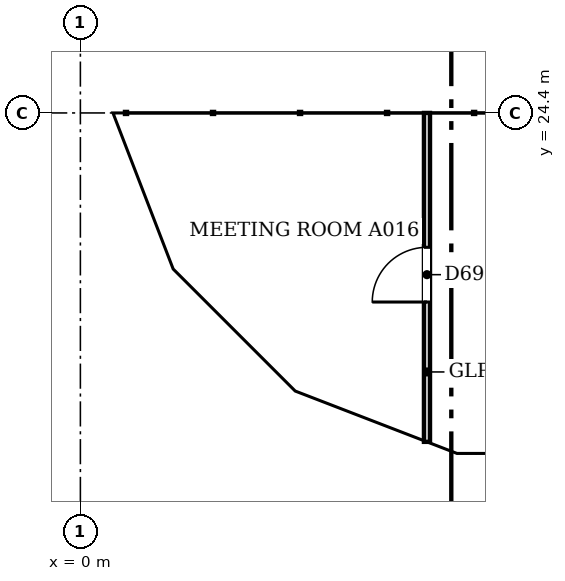
"""IFC4 building model, lengths in metres.
Left out: names, types, materials, properties, quantities, classifications, styles, units other than length and angle.
Written with IfcOpenShell. Run it as: python <this file> out.ifc"""

import sys

from ifc_helpers import new_model, si_unit, direction, frame, frame_2d, origin, place, context, subcontext, project, spatial, polyline, rectangle, outline, extrude, faceted_brep, source, transform, mapped, element, fill, save


model = new_model("IFC4")
c1 = context("Model", 3, precision=1e-05, world=origin(), true_north=direction((0.0, 1.0)))
c2 = subcontext(c1, "Body", "Model", "MODEL_VIEW")
j1 = project(units=[si_unit("LENGTHUNIT", "METRE"), si_unit("PLANEANGLEUNIT", "RADIAN")], contexts=[c1])
p1 = place(None, origin())
s1 = spatial("IfcSite", under=j1, at=p1, CompositionType="ELEMENT")
p2 = place(p1, origin())
s2 = spatial("IfcBuilding", under=s1, at=p2, CompositionType="ELEMENT")
p3 = place(p2, frame((0.0, 0.0, 25.8)))
s3 = spatial("IfcBuildingStorey", under=s2, at=p3, CompositionType="ELEMENT", Elevation=25.8)
m1 = source(origin(), c2, "Body", "Brep", [
    faceted_brep([(6.053, -0.25, 0.0), (3.05, -0.25, 3.8), (0.0, -0.25, 0.0), (0.0, 0.25, 0.0), (3.05, 0.25, 3.8), (6.007, 0.25, 0.059), (6.007, 0.25, 0.0), (6.053, 0.0, 0.0)], [[[0, 1, 2]], [[3, 4, 5, 6]], [[5, 4, 1, 0, 7]], [[4, 3, 2, 1]], [[3, 6, 7, 0, 2]], [[7, 6, 5]]]),
])
p4 = place(p3, frame((0.25, 30.5, 0.0), z_axis=(0.0, 0.0, 1.0), x_axis=(0.0, -1.0, 0.0)))
e1 = element("IfcWall", 1, at=p4, inside=s3, PredefinedType="SOLIDWALL", context=c2, shape_type="MappedRepresentation", body=[
    mapped(m1, transform((0.0, 0.0, 0.0), scale=1.0)),
])
m2 = source(origin(), c2, "Body", "SweptSolid", [
    extrude(outline(polyline([(5.537, 0.25), (3.049, 3.399), (0.521, 0.25), (5.537, 0.25)])), frame((0.0, 0.26, 0.0), z_axis=(0.0, -1.0, 0.0), x_axis=(1.0, 0.0, 0.0)), (0.0, 0.0, 1.0), 0.52),
])
p5 = place(p4, origin())
e2 = element("IfcOpeningElement", 2, at=p5, cuts=e1, PredefinedType="OPENING", context=c2, shape_type="MappedRepresentation", body=[
    mapped(m2, transform((0.0, 0.0, 0.0), scale=1.0)),
])
m3 = source(origin(), c2, "Body", "Brep", [
    faceted_brep([(3.003, -0.25, 3.732), (2.95, -0.25, 3.8), (0.0, -0.25, 0.0), (3.003, -0.25, 0.0), (0.047, 0.25, 0.06), (2.898, 0.25, 3.732), (2.898, 0.25, 0.0), (0.047, 0.25, 0.0), (2.95, 0.0, 3.8), (0.0, 0.0, 0.0)], [[[0, 1, 2, 3]], [[4, 5, 6, 7]], [[8, 1, 0]], [[5, 4, 9, 2, 1, 8]], [[7, 6, 3, 2, 9]], [[7, 9, 4]], [[3, 6, 5, 8, 0]]]),
])
p6 = place(p3, frame((0.25, 24.447, 0.0), z_axis=(0.0, 0.0, 1.0), x_axis=(0.35992665181, -0.932980602862, 0.0)))
e3 = element("IfcWall", 3, at=p6, inside=s3, PredefinedType="SOLIDWALL", context=c2, shape_type="MappedRepresentation", body=[
    mapped(m3, transform((0.0, 0.0, 0.0), scale=1.0)),
])
m4 = source(origin(), c2, "Body", "SweptSolid", [
    extrude(outline(polyline([(2.75, 3.135), (0.511, 0.25), (2.75, 0.25), (2.75, 3.135)])), frame((0.0, 0.26, 0.0), z_axis=(0.0, -1.0, 0.0), x_axis=(1.0, 0.0, 0.0)), (0.0, 0.0, 1.0), 0.52),
])
p7 = place(p6, origin())
e4 = element("IfcOpeningElement", 4, at=p7, cuts=e3, PredefinedType="OPENING", context=c2, shape_type="MappedRepresentation", body=[
    mapped(m4, transform((0.0, 0.0, 0.0), scale=1.0)),
])
m5 = source(origin(), c2, "Body", "Brep", [
    faceted_brep([(2.997, -0.25, 0.0), (0.053, -0.25, 3.8), (0.0, -0.25, 3.732), (0.0, -0.25, 0.0), (0.106, 0.25, 3.732), (2.944, 0.25, 0.068), (2.944, 0.25, 0.0), (0.106, 0.25, 0.0), (0.053, 0.0, 3.8), (2.997, 0.0, 0.0)], [[[0, 1, 2, 3]], [[4, 5, 6, 7]], [[5, 4, 8, 1, 0, 9]], [[2, 1, 8]], [[7, 6, 9, 0, 3]], [[7, 3, 2, 8, 4]], [[9, 6, 5]]]),
])
p8 = place(p3, frame((1.274, 21.731, 0.0), z_axis=(0.0, 0.0, 1.0), x_axis=(0.707147509625, -0.707066050402, 0.0)))
e5 = element("IfcWall", 5, at=p8, inside=s3, PredefinedType="SOLIDWALL", context=c2, shape_type="MappedRepresentation", body=[
    mapped(m5, transform((0.0, 0.0, 0.0), scale=1.0)),
])
m6 = source(origin(), c2, "Body", "SweptSolid", [
    extrude(outline(polyline([(2.487, 0.25), (0.253, 3.134), (0.253, 0.25), (2.487, 0.25)])), frame((0.0, 0.26, 0.0), z_axis=(0.0, -1.0, 0.0), x_axis=(1.0, 0.0, 0.0)), (0.0, 0.0, 1.0), 0.52),
])
p9 = place(p8, origin())
e6 = element("IfcOpeningElement", 6, at=p9, cuts=e5, PredefinedType="OPENING", context=c2, shape_type="MappedRepresentation", body=[
    mapped(m6, transform((0.0, 0.0, 0.0), scale=1.0)),
])
m7 = source(origin(), c2, "Body", "Brep", [
    faceted_brep([(2.997, -0.25, 3.741), (2.95, -0.25, 3.8), (0.0, -0.25, 0.0), (2.997, -0.25, 0.0), (0.053, 0.25, 0.068), (2.904, 0.25, 3.74), (2.904, 0.25, 0.0), (0.053, 0.25, 0.0), (2.95, 0.0, 3.8), (0.0, 0.0, 0.0)], [[[0, 1, 2, 3]], [[4, 5, 6, 7]], [[8, 1, 0]], [[5, 4, 9, 2, 1, 8]], [[7, 6, 3, 2, 9]], [[7, 9, 4]], [[3, 6, 5, 8, 0]]]),
])
p10 = place(p3, frame((3.394, 19.612, 0.0), z_axis=(0.0, 0.0, 1.0), x_axis=(0.932990326376, -0.359901446078, 0.0)))
e7 = element("IfcWall", 7, at=p10, inside=s3, PredefinedType="SOLIDWALL", context=c2, shape_type="MappedRepresentation", body=[
    mapped(m7, transform((0.0, 0.0, 0.0), scale=1.0)),
])
p11 = place(p10, origin())
e8 = element("IfcOpeningElement", 8, at=p11, cuts=e7, PredefinedType="OPENING", context=c2, shape_type="MappedRepresentation", body=[
    mapped(m4, transform((0.0, 0.0, 0.0), scale=1.0)),
])
m8 = source(origin(), c2, "Body", "Brep", [
    faceted_brep([(3.05, -0.25, 0.0), (0.047, -0.25, 3.8), (0.0, -0.25, 3.74), (0.0, -0.25, 0.0), (0.093, 0.25, 3.741), (3.05, 0.25, 0.0), (0.093, 0.25, 0.0), (0.047, 0.0, 3.8)], [[[0, 1, 2, 3]], [[4, 5, 6]], [[5, 4, 7, 1, 0]], [[2, 1, 7]], [[6, 5, 0, 3]], [[6, 3, 2, 7, 4]]]),
])
p12 = place(p3, frame((6.1, 18.55, 0.0), z_axis=(0.0, 0.0, 1.0), x_axis=(1.0, 0.0, 0.0)))
e9 = element("IfcWall", 9, at=p12, inside=s3, PredefinedType="SOLIDWALL", context=c2, shape_type="MappedRepresentation", body=[
    mapped(m8, transform((0.0, 0.0, 0.0), scale=1.0)),
])
m9 = source(origin(), c2, "Body", "SweptSolid", [
    extrude(outline(polyline([(2.534, 0.25), (0.247, 3.144), (0.247, 0.25), (2.534, 0.25)])), frame((0.0, 0.26, 0.0), z_axis=(0.0, -1.0, 0.0), x_axis=(1.0, 0.0, 0.0)), (0.0, 0.0, 1.0), 0.52),
])
p13 = place(p12, origin())
e10 = element("IfcOpeningElement", 10, at=p13, cuts=e9, PredefinedType="OPENING", context=c2, shape_type="MappedRepresentation", body=[
    mapped(m9, transform((0.0, 0.0, 0.0), scale=1.0)),
])
p14 = place(p2, frame((0.0, 0.0, 29.6)))
s4 = spatial("IfcBuildingStorey", under=s2, at=p14, CompositionType="ELEMENT", Elevation=29.6)
m10 = source(origin(), c2, "Body", "Brep", [
    faceted_brep([(3.003, -0.25, 0.0), (3.05, -0.25, 0.06), (3.05, -0.25, 7.54), (3.003, -0.25, 7.6), (0.0, -0.25, 3.8), (0.0, 0.25, 3.8), (2.957, 0.25, 7.541), (2.957, 0.25, 0.059), (3.003, 0.0, 0.0), (3.003, 0.0, 7.6)], [[[0, 1, 2, 3, 4]], [[5, 6, 7]], [[1, 0, 8]], [[9, 3, 2]], [[6, 5, 4, 3, 9]], [[5, 7, 8, 0, 4]], [[1, 8, 7, 6, 9, 2]]]),
])
p15 = place(p14, frame((0.25, 27.45, -3.8), z_axis=(0.0, 0.0, 1.0), x_axis=(0.0, -1.0, 0.0)))
e11 = element("IfcWall", 11, at=p15, inside=s4, PredefinedType="SOLIDWALL", context=c2, shape_type="MappedRepresentation", body=[
    mapped(m10, transform((0.0, 0.0, 0.0), scale=1.0)),
])
m11 = source(origin(), c2, "Body", "SweptSolid", [
    extrude(outline(polyline([(2.803, 6.944), (0.319, 3.8), (2.803, 0.656), (2.803, 6.944)])), frame((0.0, 0.26, 0.0), z_axis=(0.0, -1.0, 0.0), x_axis=(1.0, 0.0, 0.0)), (0.0, 0.0, 1.0), 0.52),
])
p16 = place(p15, origin())
e12 = element("IfcOpeningElement", 12, at=p16, cuts=e11, PredefinedType="OPENING", context=c2, shape_type="MappedRepresentation", body=[
    mapped(m11, transform((0.0, 0.0, 0.0), scale=1.0)),
])
m12 = source(origin(), c2, "Body", "Brep", [
    faceted_brep([(0.047, -0.25, 0.0), (2.997, -0.25, 3.8), (0.047, -0.25, 7.6), (0.0, -0.25, 7.541), (0.0, -0.25, 0.059), (0.093, 0.25, 7.54), (2.944, 0.25, 3.868), (2.944, 0.25, 3.732), (0.093, 0.25, 0.06), (2.997, 0.0, 3.8), (0.047, 0.0, 0.0), (0.047, 0.0, 7.6)], [[[0, 1, 2, 3, 4]], [[5, 6, 7, 8]], [[8, 7, 9, 1, 0, 10]], [[6, 5, 11, 2, 1, 9]], [[3, 2, 11]], [[10, 0, 4]], [[8, 10, 4, 3, 11, 5]], [[7, 6, 9]]]),
])
p17 = place(p14, frame((0.233, 24.49, -3.8), z_axis=(0.0, 0.0, 1.0), x_axis=(0.359901446078, -0.932990326376, 0.0)))
e13 = element("IfcWall", 13, at=p17, inside=s4, PredefinedType="SOLIDWALL", context=c2, shape_type="MappedRepresentation", body=[
    mapped(m12, transform((0.0, 0.0, 0.0), scale=1.0)),
])
m13 = source(origin(), c2, "Body", "SweptSolid", [
    extrude(outline(polyline([(0.247, 0.665), (2.681, 3.8), (0.247, 6.935), (0.247, 0.665)])), frame((0.0, 0.26, 0.0), z_axis=(0.0, -1.0, 0.0), x_axis=(1.0, 0.0, 0.0)), (0.0, 0.0, 1.0), 0.52),
])
p18 = place(p17, origin())
e14 = element("IfcOpeningElement", 14, at=p18, cuts=e13, PredefinedType="OPENING", context=c2, shape_type="MappedRepresentation", body=[
    mapped(m13, transform((0.0, 0.0, 0.0), scale=1.0)),
])
m14 = source(origin(), c2, "Body", "Brep", [
    faceted_brep([(2.944, -0.25, 0.0), (2.997, -0.25, 0.068), (2.997, -0.25, 7.532), (2.944, -0.25, 7.6), (0.0, -0.25, 3.8), (0.053, 0.25, 3.868), (2.891, 0.25, 7.532), (2.891, 0.25, 0.068), (0.053, 0.25, 3.732), (2.944, 0.0, 0.0), (2.944, 0.0, 7.6), (0.0, 0.0, 3.8)], [[[0, 1, 2, 3, 4]], [[5, 6, 7, 8]], [[1, 0, 9]], [[10, 3, 2]], [[6, 5, 11, 4, 3, 10]], [[8, 7, 9, 0, 4, 11]], [[8, 11, 5]], [[1, 9, 7, 6, 10, 2]]]),
])
p19 = place(p14, frame((1.312, 21.694, -3.8), z_axis=(0.0, 0.0, 1.0), x_axis=(0.707066050402, -0.707147509625, 0.0)))
e15 = element("IfcWall", 15, at=p19, inside=s4, PredefinedType="SOLIDWALL", context=c2, shape_type="MappedRepresentation", body=[
    mapped(m14, transform((0.0, 0.0, 0.0), scale=1.0)),
])
m15 = source(origin(), c2, "Body", "SweptSolid", [
    extrude(outline(polyline([(2.744, 6.934), (0.316, 3.8), (2.744, 0.666), (2.744, 6.934)])), frame((0.0, 0.26, 0.0), z_axis=(0.0, -1.0, 0.0), x_axis=(1.0, 0.0, 0.0)), (0.0, 0.0, 1.0), 0.52),
])
p20 = place(p19, origin())
e16 = element("IfcOpeningElement", 16, at=p20, cuts=e15, PredefinedType="OPENING", context=c2, shape_type="MappedRepresentation", body=[
    mapped(m15, transform((0.0, 0.0, 0.0), scale=1.0)),
])
m16 = source(origin(), c2, "Body", "Brep", [
    faceted_brep([(0.053, -0.25, 0.0), (3.003, -0.25, 3.8), (0.053, -0.25, 7.6), (0.0, -0.25, 7.531), (0.0, -0.25, 0.068), (0.106, 0.25, 7.532), (2.957, 0.25, 3.86), (2.957, 0.25, 3.74), (0.106, 0.25, 0.068), (3.003, 0.0, 3.8), (0.053, 0.0, 0.0), (0.053, 0.0, 7.6)], [[[0, 1, 2, 3, 4]], [[5, 6, 7, 8]], [[8, 7, 9, 1, 0, 10]], [[6, 5, 11, 2, 1, 9]], [[3, 2, 11]], [[10, 0, 4]], [[8, 10, 4, 3, 11, 5]], [[7, 6, 9]]]),
])
p21 = place(p14, frame((3.344, 19.631, -3.8), z_axis=(0.0, 0.0, 1.0), x_axis=(0.933007896601, -0.359855894603, 0.0)))
e17 = element("IfcWall", 17, at=p21, inside=s4, PredefinedType="SOLIDWALL", context=c2, shape_type="MappedRepresentation", body=[
    mapped(m16, transform((0.0, 0.0, 0.0), scale=1.0)),
])
m17 = source(origin(), c2, "Body", "SweptSolid", [
    extrude(outline(polyline([(0.253, 0.665), (2.687, 3.8), (0.253, 6.935), (0.253, 0.665)])), frame((0.0, 0.26, 0.0), z_axis=(0.0, -1.0, 0.0), x_axis=(1.0, 0.0, 0.0)), (0.0, 0.0, 1.0), 0.52),
])
p22 = place(p21, origin())
e18 = element("IfcOpeningElement", 18, at=p22, cuts=e17, PredefinedType="OPENING", context=c2, shape_type="MappedRepresentation", body=[
    mapped(m17, transform((0.0, 0.0, 0.0), scale=1.0)),
])
m18 = source(origin(), c2, "Body", "Brep", [
    faceted_brep([(3.003, -0.25, 0.0), (6.053, -0.25, 3.8), (3.003, -0.25, 7.6), (0.0, -0.25, 3.8), (0.047, 0.25, 3.859), (3.003, 0.25, 7.6), (6.053, 0.25, 3.8), (3.003, 0.25, 0.0), (0.047, 0.25, 3.741), (0.0, 0.0, 3.8)], [[[0, 1, 2, 3]], [[4, 5, 6, 7, 8]], [[7, 6, 1, 0]], [[6, 5, 2, 1]], [[5, 4, 9, 3, 2]], [[8, 7, 0, 3, 9]], [[8, 9, 4]]]),
])
p23 = place(p14, frame((6.146, 18.55, -3.8), z_axis=(0.0, 0.0, 1.0), x_axis=(1.0, 0.0, 0.0)))
e19 = element("IfcWall", 19, at=p23, inside=s4, PredefinedType="SOLIDWALL", context=c2, shape_type="MappedRepresentation", body=[
    mapped(m18, transform((0.0, 0.0, 0.0), scale=1.0)),
])
m19 = source(origin(), c2, "Body", "SweptSolid", [
    extrude(outline(polyline([(3.005, 0.401), (5.733, 3.8), (3.005, 7.199), (0.319, 3.8), (3.005, 0.401)])), frame((0.0, 0.26, 0.0), z_axis=(0.0, -1.0, 0.0), x_axis=(1.0, 0.0, 0.0)), (0.0, 0.0, 1.0), 0.52),
])
p24 = place(p23, origin())
e20 = element("IfcOpeningElement", 20, at=p24, cuts=e19, PredefinedType="OPENING", context=c2, shape_type="MappedRepresentation", body=[
    mapped(m19, transform((0.0, 0.0, 0.0), scale=1.0)),
])
p25 = place(p3, frame((5.7, 18.99, 0.0), z_axis=(0.0, 0.0, 1.0), x_axis=(0.0, 1.0, 0.0)))
e21 = element("IfcWall", 21, at=p25, inside=s3, PredefinedType="PARTITIONING", context=c2, shape_type="SweptSolid", body=[
    extrude(rectangle(XDim=5.41, YDim=0.1, at=frame_2d((2.705, 0.0))), origin(), (0.0, 0.0, 1.0), 3.067),
])
m20 = source(origin(), c2, "Body", "SweptSolid", [
    extrude(rectangle(XDim=0.9, YDim=2.1, at=frame_2d((0.45, 1.05))), frame((0.0, 0.06, 0.0), z_axis=(0.0, -1.0, 0.0), x_axis=(1.0, 0.0, 0.0)), (0.0, 0.0, 1.0), 0.12),
])
p26 = place(p25, frame((2.3, 0.0, 0.0)))
e22 = element("IfcOpeningElement", 22, at=p26, cuts=e21, PredefinedType="OPENING", context=c2, shape_type="MappedRepresentation", body=[
    mapped(m20, transform((0.0, 0.0, 0.0), scale=1.0)),
])
m21 = source(origin(), c2, "Body", "SweptSolid", [
    extrude(rectangle(XDim=0.9, YDim=2.1, at=frame_2d((0.45, 1.05))), frame((0.0, 0.025, 0.0), z_axis=(0.0, -1.0, 0.0), x_axis=(1.0, 0.0, 0.0)), (0.0, 0.0, 1.0), 0.05),
])
p27 = place(p26, origin())
e23 = element("IfcDoor", 23, at=p27, inside=s3, OperationType="SINGLE_SWING_LEFT", PredefinedType="DOOR", context=c2, shape_type="MappedRepresentation", body=[
    mapped(m21, transform((0.0, 0.0, 0.0), scale=1.0)),
])
fill(e22, e23)
save(model, sys.argv[1])
